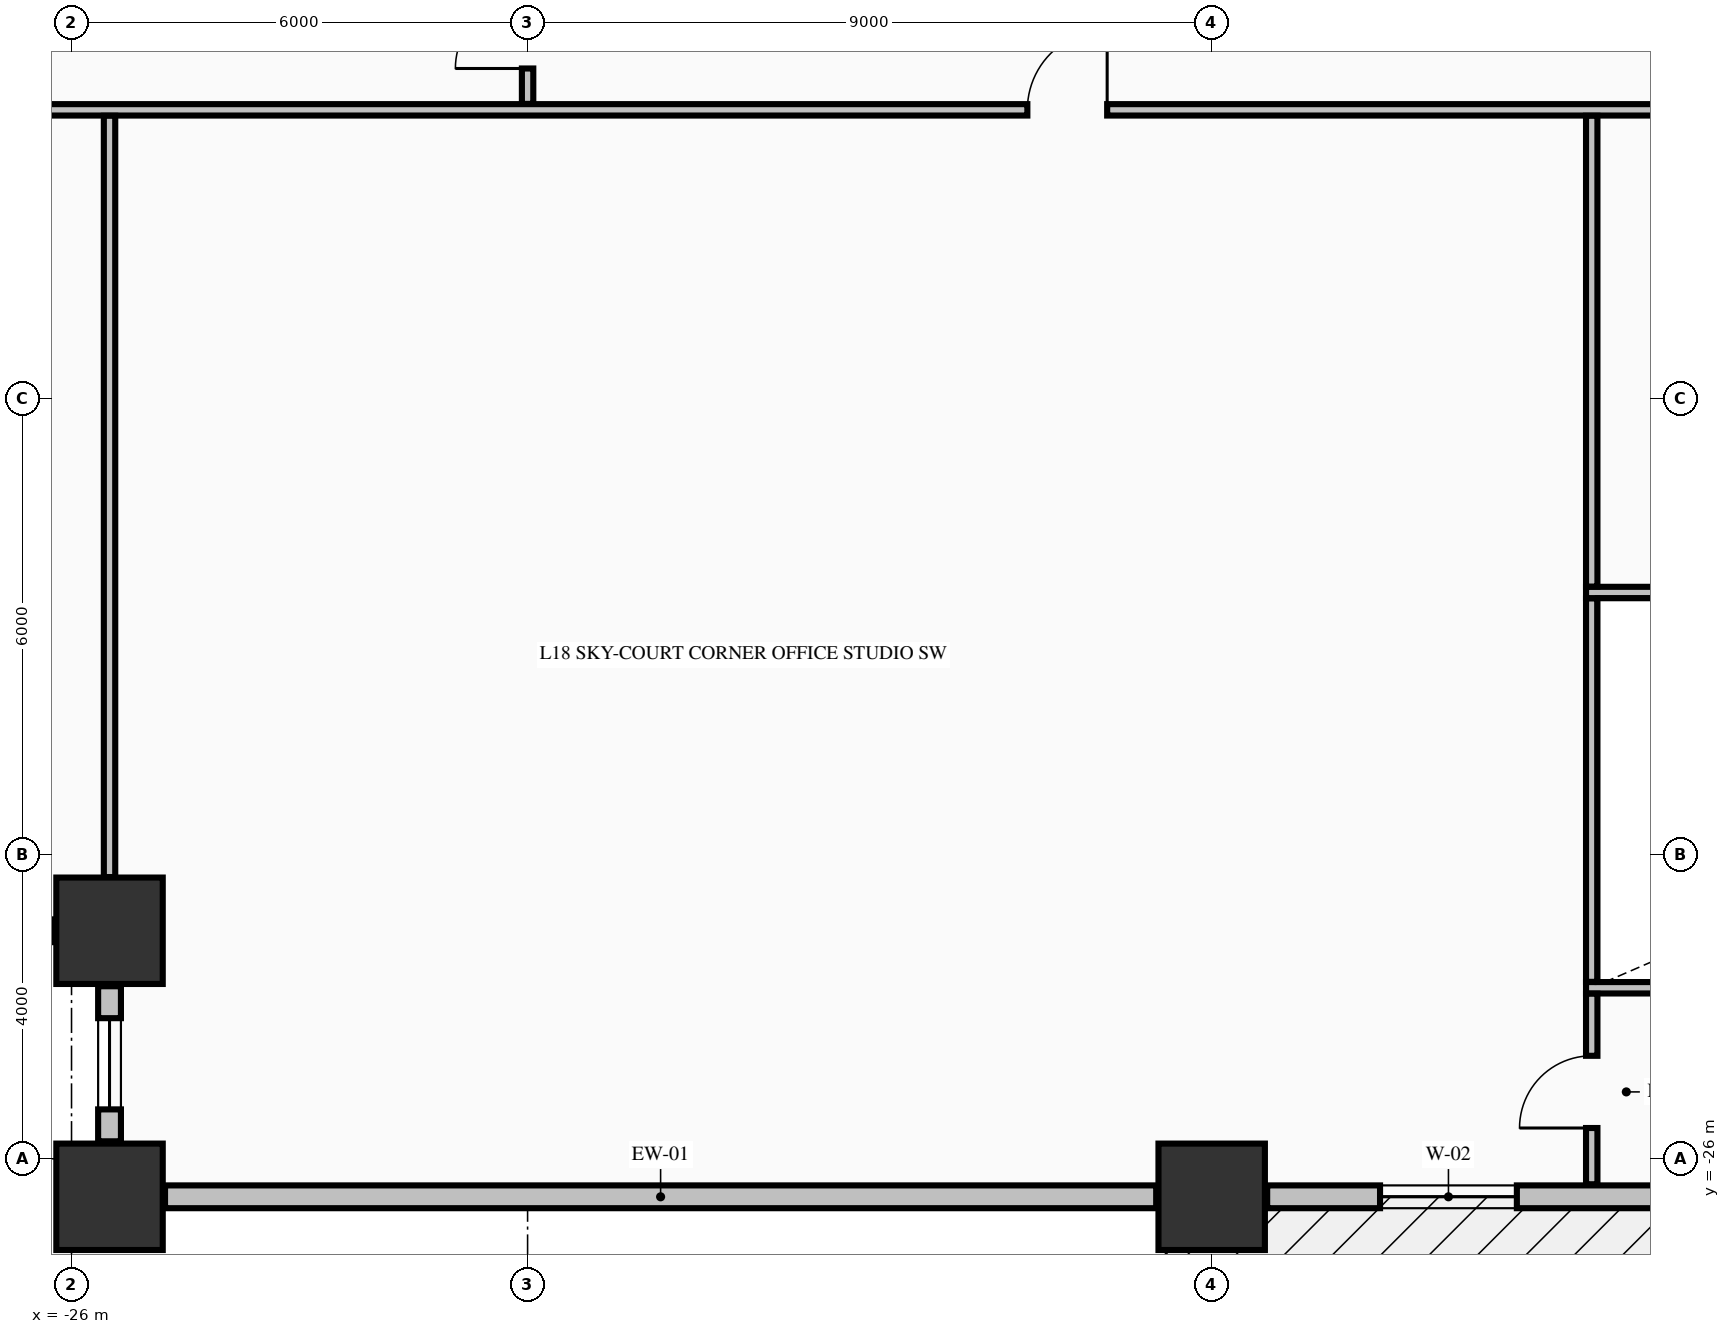
"""IFC4 building model, lengths in metres.
Left out: names, types, materials, properties, quantities, classifications, styles, units other than length and angle.
Written with IfcOpenShell. Run it as: python <this file> out.ifc"""

import sys

from ifc_helpers import new_model, si_unit, direction, frame, frame_2d, origin, origin_2d, place, context, subcontext, project, spatial, rectangle, extrude, element, fill, save


model = new_model("IFC4")
c1 = context("Model", 3, precision=1e-05, world=origin(), true_north=direction((0.0, 1.0)))
c2 = subcontext(c1, "Body", "Model", "MODEL_VIEW")
j1 = project(units=[si_unit("LENGTHUNIT", "METRE"), si_unit("PLANEANGLEUNIT", "RADIAN")], contexts=[c1])
p1 = place(None, origin())
s1 = spatial("IfcSite", under=j1, at=p1, CompositionType="ELEMENT")
p2 = place(p1, origin())
s2 = spatial("IfcBuilding", under=s1, at=p2, CompositionType="ELEMENT")
p3 = place(p2, frame((0.0, 0.0, 75.04)))
s3 = spatial("IfcBuildingStorey", under=s2, at=p3, CompositionType="ELEMENT", Elevation=75.04)
for number, where, z_axis, x_axis in (
    (1, (-25.5, -26.5, -0.25), (0.0, 0.0, 1.0), (1.0, 0.0, 0.0)),
    (2, (-11.0, -26.5, -0.25), (0.0, 0.0, 1.0), (1.0, 0.0, 0.0)),
    (3, (-25.5, -23.0, -0.25), (0.0, 0.0, 1.0), (1.0, 0.0, 0.0)),
):
    element("IfcColumn", number, at=place(p3, frame(where, z_axis=z_axis, x_axis=x_axis)), inside=s3, PredefinedType="COLUMN", context=c2, shape_type="SweptSolid", body=[
        extrude(rectangle(XDim=1.4, YDim=1.4, at=origin_2d()), origin(), (0.0, 0.0, 1.0), 3.57),
    ])
p4 = place(p3, frame((-28.27, -23.0, 0.0), z_axis=(0.0, 0.0, 1.0), x_axis=(1.0, 0.0, 0.0)))
e4 = element("IfcWall", 4, at=p4, inside=s3, PredefinedType="STANDARD", context=c2, shape_type="SweptSolid", body=[
    extrude(rectangle(XDim=2.04, YDim=0.3, at=frame_2d((1.02, 0.0))), origin(), (0.0, 0.0, 1.0), 2.712),
])
p5 = place(p4, frame((0.42, 0.0, 0.82)))
e5 = element("IfcOpeningElement", 5, at=p5, cuts=e4, PredefinedType="OPENING", context=c2, shape_type="SweptSolid", body=[
    extrude(rectangle(XDim=1.2, YDim=1.65, at=frame_2d((0.6, 0.825))), frame((0.0, 0.16, 0.0), z_axis=(0.0, -1.0, 0.0), x_axis=(1.0, 0.0, 0.0)), (0.0, 0.0, 1.0), 0.32),
])
p6 = place(p3, frame((-25.5, -23.73, 0.0), z_axis=(0.0, 0.0, 1.0), x_axis=(0.0, -1.0, 0.0)))
e6 = element("IfcWall", 6, at=p6, inside=s3, PredefinedType="STANDARD", context=c2, shape_type="SweptSolid", body=[
    extrude(rectangle(XDim=2.04, YDim=0.3, at=frame_2d((1.02, 0.0))), origin(), (0.0, 0.0, 1.0), 2.712),
])
p7 = place(p6, frame((0.42, 0.0, 0.82)))
e7 = element("IfcOpeningElement", 7, at=p7, cuts=e6, PredefinedType="OPENING", context=c2, shape_type="SweptSolid", body=[
    extrude(rectangle(XDim=1.2, YDim=1.65, at=frame_2d((0.6, 0.825))), frame((0.0, 0.16, 0.0), z_axis=(0.0, -1.0, 0.0), x_axis=(1.0, 0.0, 0.0)), (0.0, 0.0, 1.0), 0.32),
])
p8 = place(p3, frame((-24.77, -26.5, 0.0), z_axis=(0.0, 0.0, 1.0), x_axis=(1.0, 0.0, 0.0)))
e8 = element("IfcWall", 8, at=p8, inside=s3, PredefinedType="STANDARD", context=c2, shape_type="SweptSolid", body=[
    extrude(rectangle(XDim=13.04, YDim=0.3, at=frame_2d((6.52, 0.0))), origin(), (0.0, 0.0, 1.0), 2.712),
])
p9 = place(p3, frame((-10.27, -26.5, 0.0), z_axis=(0.0, 0.0, 1.0), x_axis=(1.0, 0.0, 0.0)))
e9 = element("IfcWall", 9, at=p9, inside=s3, PredefinedType="STANDARD", context=c2, shape_type="SweptSolid", body=[
    extrude(rectangle(XDim=9.54, YDim=0.3, at=frame_2d((4.77, 0.0))), origin(), (0.0, 0.0, 1.0), 2.712),
])
p10 = place(p9, frame((8.24, 0.0, 0.0)))
e10 = element("IfcOpeningElement", 10, at=p10, cuts=e9, PredefinedType="OPENING", context=c2, shape_type="SweptSolid", body=[
    extrude(rectangle(XDim=1.1, YDim=2.15, at=frame_2d((0.55, 1.075))), frame((0.0, 0.16, 0.0), z_axis=(0.0, -1.0, 0.0), x_axis=(1.0, 0.0, 0.0)), (0.0, 0.0, 1.0), 0.32),
])
p11 = place(p9, frame((1.485, 0.0, 0.78)))
e11 = element("IfcOpeningElement", 11, at=p11, cuts=e9, PredefinedType="OPENING", context=c2, shape_type="SweptSolid", body=[
    extrude(rectangle(XDim=1.8, YDim=1.72, at=frame_2d((0.9, 0.86))), frame((0.0, 0.16, 0.0), z_axis=(0.0, -1.0, 0.0), x_axis=(1.0, 0.0, 0.0)), (0.0, 0.0, 1.0), 0.32),
])
for number, where, z_axis, x_axis in (
    (12, (-6.075, -23.75, 0.0), (0.0, 0.0, 1.0), (1.0, 0.0, 0.0)),
    (13, (-6.075, -18.55, 0.0), (0.0, 0.0, 1.0), (1.0, 0.0, 0.0)),
):
    element("IfcWall", number, at=place(p3, frame(where, z_axis=z_axis, x_axis=x_axis)), inside=s3, PredefinedType="PARTITIONING", context=c2, shape_type="SweptSolid", body=[
        extrude(rectangle(XDim=12.15, YDim=0.15, at=frame_2d((6.075, 0.0))), origin(), (0.0, 0.0, 1.0), 3.32),
    ])
p12 = place(p3, frame((-28.835, -12.2, 0.0), z_axis=(0.0, 0.0, 1.0), x_axis=(1.0, 0.0, 0.0)))
e14 = element("IfcWall", 14, at=p12, inside=s3, PredefinedType="PARTITIONING", context=c2, shape_type="SweptSolid", body=[
    extrude(rectangle(XDim=52.67, YDim=0.15, at=frame_2d((26.335, 0.0))), origin(), (0.0, 0.0, 1.0), 3.32),
])
p13 = place(p12, frame((30.685, 0.0, 0.0)))
e15 = element("IfcOpeningElement", 15, at=p13, cuts=e14, PredefinedType="OPENING", context=c2, shape_type="SweptSolid", body=[
    extrude(rectangle(XDim=1.1, YDim=2.15, at=frame_2d((0.55, 1.075))), frame((0.0, 0.085, 0.0), z_axis=(0.0, -1.0, 0.0), x_axis=(1.0, 0.0, 0.0)), (0.0, 0.0, 1.0), 0.17),
])
p14 = place(p12, frame((15.41, 0.0, 0.0)))
e16 = element("IfcOpeningElement", 16, at=p14, cuts=e14, PredefinedType="OPENING", context=c2, shape_type="SweptSolid", body=[
    extrude(rectangle(XDim=1.05, YDim=2.15, at=frame_2d((0.525, 1.075))), frame((0.0, 0.085, 0.0), z_axis=(0.0, -1.0, 0.0), x_axis=(1.0, 0.0, 0.0)), (0.0, 0.0, 1.0), 0.17),
])
p15 = place(p12, frame((41.21, 0.0, 0.0)))
e17 = element("IfcOpeningElement", 17, at=p15, cuts=e14, PredefinedType="OPENING", context=c2, shape_type="SweptSolid", body=[
    extrude(rectangle(XDim=1.05, YDim=2.15, at=frame_2d((0.525, 1.075))), frame((0.0, 0.085, 0.0), z_axis=(0.0, -1.0, 0.0), x_axis=(1.0, 0.0, 0.0)), (0.0, 0.0, 1.0), 0.17),
])
p16 = place(p3, frame((-25.5, -22.294, 0.0), z_axis=(0.0, 0.0, 1.0), x_axis=(0.0, 1.0, 0.0)))
e18 = element("IfcWall", 18, at=p16, inside=s3, PredefinedType="PARTITIONING", context=c2, shape_type="SweptSolid", body=[
    extrude(rectangle(XDim=10.016, YDim=0.15, at=frame_2d((5.008, 0.0))), origin(), (0.0, 0.0, 1.0), 3.32),
])
p17 = place(p3, frame((-20.0, -12.122, 0.0), z_axis=(0.0, 0.0, 1.0), x_axis=(0.0, 1.0, 0.0)))
e19 = element("IfcWall", 19, at=p17, inside=s3, PredefinedType="PARTITIONING", context=c2, shape_type="SweptSolid", body=[
    extrude(rectangle(XDim=1.566, YDim=0.15, at=frame_2d((0.783, 0.0))), origin(), (0.0, 0.0, 1.0), 2.66),
])
p18 = place(p17, frame((0.466, 0.0, 0.0)))
e20 = element("IfcOpeningElement", 20, at=p18, cuts=e19, PredefinedType="OPENING", context=c2, shape_type="SweptSolid", body=[
    extrude(rectangle(XDim=0.95, YDim=2.15, at=frame_2d((0.475, 1.075))), frame((0.0, 0.085, 0.0), z_axis=(0.0, -1.0, 0.0), x_axis=(1.0, 0.0, 0.0)), (0.0, 0.0, 1.0), 0.17),
])
p19 = place(p3, frame((-6.0, -26.335, 0.0), z_axis=(0.0, 0.0, 1.0), x_axis=(0.0, 1.0, 0.0)))
e21 = element("IfcWall", 21, at=p19, inside=s3, PredefinedType="PARTITIONING", context=c2, shape_type="SweptSolid", body=[
    extrude(rectangle(XDim=2.507, YDim=0.15, at=frame_2d((1.253, 0.0))), origin(), (0.0, 0.0, 1.0), 3.32),
])
p20 = place(p19, frame((0.74, 0.0, 0.0)))
e22 = element("IfcOpeningElement", 22, at=p20, cuts=e21, PredefinedType="OPENING", context=c2, shape_type="SweptSolid", body=[
    extrude(rectangle(XDim=0.95, YDim=2.15, at=frame_2d((0.475, 1.075))), frame((0.0, 0.085, 0.0), z_axis=(0.0, -1.0, 0.0), x_axis=(1.0, 0.0, 0.0)), (0.0, 0.0, 1.0), 0.17),
])
p21 = place(p3, frame((-6.0, -23.672, 0.0), z_axis=(0.0, 0.0, 1.0), x_axis=(0.0, 1.0, 0.0)))
e23 = element("IfcWall", 23, at=p21, inside=s3, PredefinedType="PARTITIONING", context=c2, shape_type="SweptSolid", body=[
    extrude(rectangle(XDim=5.044, YDim=0.15, at=frame_2d((2.522, 0.0))), origin(), (0.0, 0.0, 1.0), 3.32),
])
p22 = place(p3, frame((-6.0, -18.472, 0.0), z_axis=(0.0, 0.0, 1.0), x_axis=(0.0, 1.0, 0.0)))
e24 = element("IfcWall", 24, at=p22, inside=s3, PredefinedType="PARTITIONING", context=c2, shape_type="SweptSolid", body=[
    extrude(rectangle(XDim=6.194, YDim=0.15, at=frame_2d((3.097, 0.0))), origin(), (0.0, 0.0, 1.0), 3.32),
])
p23 = place(p7, origin())
e25 = element("IfcWindow", 25, at=p23, inside=s3, PartitioningType="SINGLE_PANEL", PredefinedType="WINDOW", context=c2, shape_type="SweptSolid", body=[
    extrude(rectangle(XDim=1.2, YDim=1.65, at=frame_2d((0.6, 0.825))), frame((0.0, 0.03, 0.0), z_axis=(0.0, -1.0, 0.0), x_axis=(1.0, 0.0, 0.0)), (0.0, 0.0, 1.0), 0.06),
])
fill(e7, e25)
p24 = place(p11, origin())
e26 = element("IfcWindow", 26, at=p24, inside=s3, PartitioningType="SINGLE_PANEL", PredefinedType="WINDOW", context=c2, shape_type="SweptSolid", body=[
    extrude(rectangle(XDim=1.8, YDim=1.72, at=frame_2d((0.9, 0.86))), frame((0.0, 0.03, 0.0), z_axis=(0.0, -1.0, 0.0), x_axis=(1.0, 0.0, 0.0)), (0.0, 0.0, 1.0), 0.06),
])
fill(e11, e26)
p25 = place(p20, origin())
e27 = element("IfcDoor", 27, at=p25, inside=s3, OperationType="SINGLE_SWING_LEFT", PredefinedType="DOOR", context=c2, shape_type="SweptSolid", body=[
    extrude(rectangle(XDim=0.95, YDim=2.15, at=frame_2d((0.475, 1.075))), frame((0.0, 0.025, 0.0), z_axis=(0.0, -1.0, 0.0), x_axis=(1.0, 0.0, 0.0)), (0.0, 0.0, 1.0), 0.05),
])
fill(e22, e27)
p26 = place(p14, origin())
e28 = element("IfcDoor", 28, at=p26, inside=s3, OperationType="SINGLE_SWING_RIGHT", PredefinedType="DOOR", context=c2, shape_type="SweptSolid", body=[
    extrude(rectangle(XDim=1.05, YDim=2.15, at=frame_2d((0.525, 1.075))), frame((0.0, 0.025, 0.0), z_axis=(0.0, -1.0, 0.0), x_axis=(1.0, 0.0, 0.0)), (0.0, 0.0, 1.0), 0.05),
])
fill(e16, e28)
p27 = place(p18, origin())
e29 = element("IfcDoor", 29, at=p27, inside=s3, OperationType="SINGLE_SWING_LEFT", PredefinedType="DOOR", context=c2, shape_type="SweptSolid", body=[
    extrude(rectangle(XDim=0.95, YDim=2.15, at=frame_2d((0.475, 1.075))), frame((0.0, 0.025, 0.0), z_axis=(0.0, -1.0, 0.0), x_axis=(1.0, 0.0, 0.0)), (0.0, 0.0, 1.0), 0.05),
])
fill(e20, e29)
save(model, sys.argv[1])
